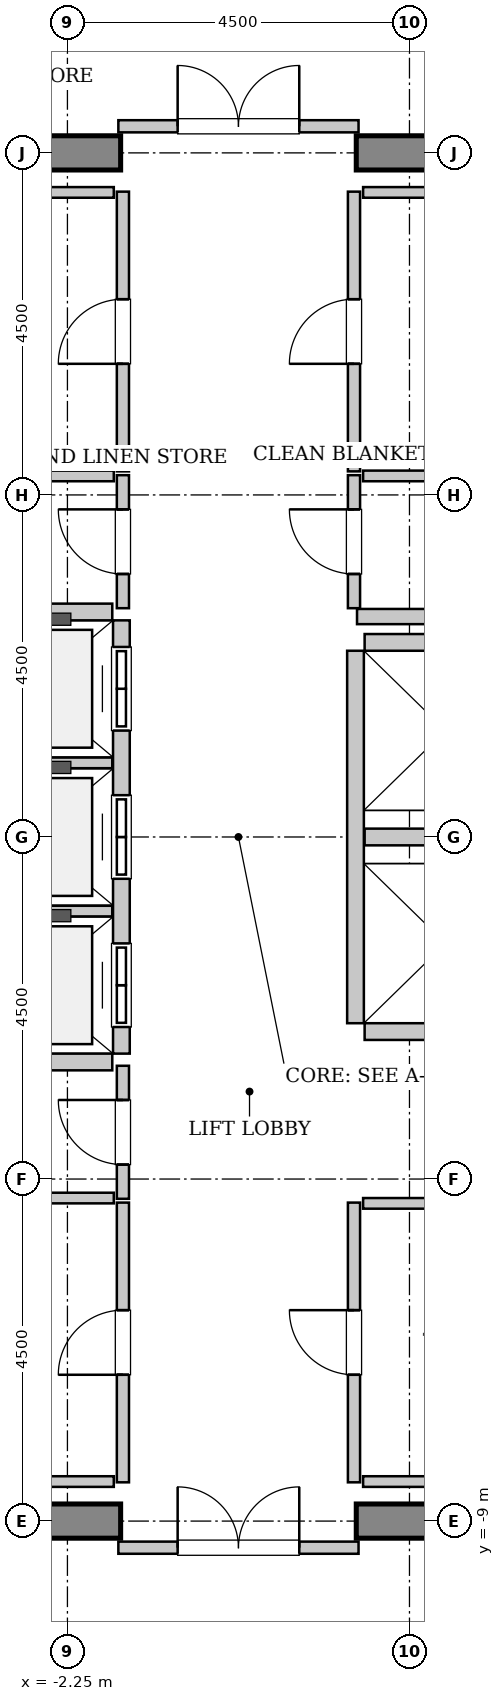
"""IFC4 building model, lengths in metres.
Left out: names, types, materials, properties, quantities, classifications, styles, units other than length and angle.
Written with IfcOpenShell. Run it as: python <this file> out.ifc"""

import sys

from ifc_helpers import new_model, si_unit, direction, frame, frame_2d, origin, place, context, subcontext, project, spatial, rectangle, extrude, source, transform, mapped, element, fill, save


model = new_model("IFC4")
c1 = context("Model", 3, precision=1e-05, world=origin(), true_north=direction((0.0, 1.0)))
c2 = subcontext(c1, "Body", "Model", "MODEL_VIEW")
j1 = project(units=[si_unit("LENGTHUNIT", "METRE"), si_unit("PLANEANGLEUNIT", "RADIAN")], contexts=[c1])
p1 = place(None, origin())
s1 = spatial("IfcSite", under=j1, at=p1, CompositionType="ELEMENT")
p2 = place(p1, origin())
s2 = spatial("IfcBuilding", under=s1, at=p2, CompositionType="ELEMENT")
p3 = place(p2, frame((0.0, 0.0, 295.0)))
s3 = spatial("IfcBuildingStorey", under=s2, at=p3, CompositionType="ELEMENT", Elevation=295.0)
m1 = source(origin(), c2, "Body", "SweptSolid", [
    extrude(rectangle(XDim=9.925, YDim=0.45, at=frame_2d((4.962, 0.0))), origin(), (0.0, 0.0, 1.0), 3.8),
])
for number, where, z_axis, x_axis in (
    (1, (-11.475, 9.0, 0.0), (0.0, 0.0, 1.0), (1.0, 0.0, 0.0)),
    (2, (1.55, 9.0, 0.0), (0.0, 0.0, 1.0), (1.0, 0.0, 0.0)),
    (3, (-11.475, -9.0, 0.0), (0.0, 0.0, 1.0), (1.0, 0.0, 0.0)),
    (4, (1.55, -9.0, 0.0), (0.0, 0.0, 1.0), (1.0, 0.0, 0.0)),
):
    element("IfcWall", number, at=place(p3, frame(where, z_axis=z_axis, x_axis=x_axis)), inside=s3, PredefinedType="SHEAR", context=c2, shape_type="MappedRepresentation", body=[
        mapped(m1, transform((0.0, 0.0, 0.0), x_axis=(1.0, 0.0, 0.0), y_axis=(0.0, 1.0, 0.0), z_axis=(0.0, 0.0, 1.0), scale=1.0)),
    ])
m2 = source(origin(), c2, "Body", "SweptSolid", [
    extrude(rectangle(XDim=5.7, YDim=0.22, at=frame_2d((2.85, 0.0))), origin(), (0.0, 0.0, 1.0), 3.535),
])
p4 = place(p3, frame((-1.54, -2.85, 0.0), z_axis=(0.0, 0.0, 1.0), x_axis=(0.0, 1.0, 0.0)))
e5 = element("IfcWall", 5, at=p4, inside=s3, PredefinedType="SOLIDWALL", context=c2, shape_type="MappedRepresentation", body=[
    mapped(m2, transform((0.0, 0.0, 0.0), x_axis=(1.0, 0.0, 0.0), y_axis=(0.0, 1.0, 0.0), z_axis=(0.0, 0.0, 1.0), scale=1.0)),
])
p5 = place(p4, frame((0.35, 0.0, 0.0)))
e6 = element("IfcOpeningElement", 6, at=p5, cuts=e5, PredefinedType="OPENING", context=c2, shape_type="SweptSolid", body=[
    extrude(rectangle(XDim=1.1, YDim=2.2, at=frame_2d((0.55, 1.1))), frame((0.0, 0.12, 0.0), z_axis=(0.0, -1.0, 0.0), x_axis=(1.0, 0.0, 0.0)), (0.0, 0.0, 1.0), 0.24),
])
p6 = place(p4, frame((2.3, 0.0, 0.0)))
e7 = element("IfcOpeningElement", 7, at=p6, cuts=e5, PredefinedType="OPENING", context=c2, shape_type="SweptSolid", body=[
    extrude(rectangle(XDim=1.1, YDim=2.2, at=frame_2d((0.55, 1.1))), frame((0.0, 0.12, 0.0), z_axis=(0.0, -1.0, 0.0), x_axis=(1.0, 0.0, 0.0)), (0.0, 0.0, 1.0), 0.24),
])
p7 = place(p4, frame((4.25, 0.0, 0.0)))
e8 = element("IfcOpeningElement", 8, at=p7, cuts=e5, PredefinedType="OPENING", context=c2, shape_type="SweptSolid", body=[
    extrude(rectangle(XDim=1.1, YDim=2.2, at=frame_2d((0.55, 1.1))), frame((0.0, 0.12, 0.0), z_axis=(0.0, -1.0, 0.0), x_axis=(1.0, 0.0, 0.0)), (0.0, 0.0, 1.0), 0.24),
])
m3 = source(origin(), c2, "Body", "SweptSolid", [
    extrude(rectangle(XDim=2.13, YDim=0.22, at=frame_2d((1.065, 0.0))), origin(), (0.0, 0.0, 1.0), 3.535),
])
p8 = place(p3, frame((-3.79, -2.96, 0.0), z_axis=(0.0, 0.0, 1.0), x_axis=(1.0, 0.0, 0.0)))
e9 = element("IfcWall", 9, at=p8, inside=s3, PredefinedType="SOLIDWALL", context=c2, shape_type="MappedRepresentation", body=[
    mapped(m3, transform((0.0, 0.0, 0.0), x_axis=(1.0, 0.0, 0.0), y_axis=(0.0, 1.0, 0.0), z_axis=(0.0, 0.0, 1.0), scale=1.0)),
])
m4 = source(origin(), c2, "Body", "SweptSolid", [
    extrude(rectangle(XDim=2.13, YDim=0.14, at=frame_2d((1.065, 0.0))), origin(), (0.0, 0.0, 1.0), 3.535),
])
for number, where, z_axis, x_axis in (
    (10, (-3.79, -0.975, 0.0), (0.0, 0.0, 1.0), (1.0, 0.0, 0.0)),
    (11, (-3.79, 0.975, 0.0), (0.0, 0.0, 1.0), (1.0, 0.0, 0.0)),
):
    element("IfcWall", number, at=place(p3, frame(where, z_axis=z_axis, x_axis=x_axis)), inside=s3, PredefinedType="PARTITIONING", context=c2, shape_type="MappedRepresentation", body=[
        mapped(m4, transform((0.0, 0.0, 0.0), x_axis=(1.0, 0.0, 0.0), y_axis=(0.0, 1.0, 0.0), z_axis=(0.0, 0.0, 1.0), scale=1.0)),
    ])
p9 = place(p3, frame((-1.66, 2.96, 0.0), z_axis=(0.0, 0.0, 1.0), x_axis=(-1.0, 0.0, 0.0)))
e12 = element("IfcWall", 12, at=p9, inside=s3, PredefinedType="SOLIDWALL", context=c2, shape_type="MappedRepresentation", body=[
    mapped(m3, transform((0.0, 0.0, 0.0), x_axis=(1.0, 0.0, 0.0), y_axis=(0.0, 1.0, 0.0), z_axis=(0.0, 0.0, 1.0), scale=1.0)),
])
m5 = source(origin(), c2, "Body", "SweptSolid", [
    extrude(rectangle(XDim=4.9, YDim=0.22, at=frame_2d((2.45, 0.0))), origin(), (0.0, 0.0, 1.0), 3.535),
])
p10 = place(p3, frame((1.54, 2.45, 0.0), z_axis=(0.0, 0.0, 1.0), x_axis=(0.0, -1.0, 0.0)))
e13 = element("IfcWall", 13, at=p10, inside=s3, PredefinedType="SOLIDWALL", context=c2, shape_type="MappedRepresentation", body=[
    mapped(m5, transform((0.0, 0.0, 0.0), x_axis=(1.0, 0.0, 0.0), y_axis=(0.0, 1.0, 0.0), z_axis=(0.0, 0.0, 1.0), scale=1.0)),
])
for number, where, z_axis, x_axis in (
    (14, (1.66, -2.56, 0.0), (0.0, 0.0, 1.0), (1.0, 0.0, 0.0)),
    (15, (1.66, 0.0, 0.0), (0.0, 0.0, 1.0), (1.0, 0.0, 0.0)),
    (16, (3.79, 2.56, 0.0), (0.0, 0.0, 1.0), (-1.0, 0.0, 0.0)),
):
    element("IfcWall", number, at=place(p3, frame(where, z_axis=z_axis, x_axis=x_axis)), inside=s3, PredefinedType="SOLIDWALL", context=c2, shape_type="MappedRepresentation", body=[
        mapped(m3, transform((0.0, 0.0, 0.0), x_axis=(1.0, 0.0, 0.0), y_axis=(0.0, 1.0, 0.0), z_axis=(0.0, 0.0, 1.0), scale=1.0)),
    ])
m6 = source(origin(), c2, "Body", "SweptSolid", [
    extrude(rectangle(XDim=2.52, YDim=0.2, at=frame_2d((1.26, 0.0))), origin(), (0.0, 0.0, 1.0), 3.535),
])
p11 = place(p3, frame((1.56, 2.9, 0.0), z_axis=(0.0, 0.0, 1.0), x_axis=(1.0, 0.0, 0.0)))
e17 = element("IfcWall", 17, at=p11, inside=s3, PredefinedType="PARTITIONING", context=c2, shape_type="MappedRepresentation", body=[
    mapped(m6, transform((0.0, 0.0, 0.0), x_axis=(1.0, 0.0, 0.0), y_axis=(0.0, 1.0, 0.0), z_axis=(0.0, 0.0, 1.0), scale=1.0)),
])
m7 = source(origin(), c2, "Body", "SweptSolid", [
    extrude(rectangle(XDim=3.16, YDim=0.16, at=frame_2d((1.58, 0.0))), origin(), (0.0, 0.0, 1.0), 2.625),
])
p12 = place(p3, frame((-1.58, 9.35, 0.0), z_axis=(0.0, 0.0, 1.0), x_axis=(1.0, 0.0, 0.0)))
e18 = element("IfcWall", 18, at=p12, inside=s3, PredefinedType="PARTITIONING", context=c2, shape_type="MappedRepresentation", body=[
    mapped(m7, transform((0.0, 0.0, 0.0), x_axis=(1.0, 0.0, 0.0), y_axis=(0.0, 1.0, 0.0), z_axis=(0.0, 0.0, 1.0), scale=1.0)),
])
p13 = place(p12, frame((0.78, 0.0, 0.0)))
e19 = element("IfcOpeningElement", 19, at=p13, cuts=e18, PredefinedType="OPENING", context=c2, shape_type="SweptSolid", body=[
    extrude(rectangle(XDim=1.6, YDim=2.3, at=frame_2d((0.8, 1.15))), frame((0.0, 0.09, 0.0), z_axis=(0.0, -1.0, 0.0), x_axis=(1.0, 0.0, 0.0)), (0.0, 0.0, 1.0), 0.18),
])
p14 = place(p3, frame((-1.58, -9.35, 0.0), z_axis=(0.0, 0.0, 1.0), x_axis=(1.0, 0.0, 0.0)))
e20 = element("IfcWall", 20, at=p14, inside=s3, PredefinedType="PARTITIONING", context=c2, shape_type="MappedRepresentation", body=[
    mapped(m7, transform((0.0, 0.0, 0.0), x_axis=(1.0, 0.0, 0.0), y_axis=(0.0, 1.0, 0.0), z_axis=(0.0, 0.0, 1.0), scale=1.0)),
])
p15 = place(p14, frame((0.78, 0.0, 0.0)))
e21 = element("IfcOpeningElement", 21, at=p15, cuts=e20, PredefinedType="OPENING", context=c2, shape_type="SweptSolid", body=[
    extrude(rectangle(XDim=1.6, YDim=2.3, at=frame_2d((0.8, 1.15))), frame((0.0, 0.09, 0.0), z_axis=(0.0, -1.0, 0.0), x_axis=(1.0, 0.0, 0.0)), (0.0, 0.0, 1.0), 0.18),
])
m8 = source(origin(), c2, "Body", "SweptSolid", [
    extrude(rectangle(XDim=1.75, YDim=0.16, at=frame_2d((0.875, 0.0))), origin(), (0.0, 0.0, 1.0), 3.535),
])
p16 = place(p3, frame((-1.52, 3.01, 0.0), z_axis=(0.0, 0.0, 1.0), x_axis=(0.0, 1.0, 0.0)))
e22 = element("IfcWall", 22, at=p16, inside=s3, PredefinedType="PARTITIONING", context=c2, shape_type="MappedRepresentation", body=[
    mapped(m8, transform((0.0, 0.0, 0.0), x_axis=(1.0, 0.0, 0.0), y_axis=(0.0, 1.0, 0.0), z_axis=(0.0, 0.0, 1.0), scale=1.0)),
])
p17 = place(p16, frame((0.45, 0.0, 0.0)))
e23 = element("IfcOpeningElement", 23, at=p17, cuts=e22, PredefinedType="OPENING", context=c2, shape_type="SweptSolid", body=[
    extrude(rectangle(XDim=0.85, YDim=2.1, at=frame_2d((0.425, 1.05))), frame((0.0, 0.09, 0.0), z_axis=(0.0, -1.0, 0.0), x_axis=(1.0, 0.0, 0.0)), (0.0, 0.0, 1.0), 0.18),
])
m9 = source(origin(), c2, "Body", "SweptSolid", [
    extrude(rectangle(XDim=2.95, YDim=0.14, at=frame_2d((1.475, 0.0))), origin(), (0.0, 0.0, 1.0), 3.535),
])
p18 = place(p3, frame((-4.59, 4.75, 0.0), z_axis=(0.0, 0.0, 1.0), x_axis=(1.0, 0.0, 0.0)))
e24 = element("IfcWall", 24, at=p18, inside=s3, PredefinedType="PARTITIONING", context=c2, shape_type="MappedRepresentation", body=[
    mapped(m9, transform((0.0, 0.0, 0.0), x_axis=(1.0, 0.0, 0.0), y_axis=(0.0, 1.0, 0.0), z_axis=(0.0, 0.0, 1.0), scale=1.0)),
])
m10 = source(origin(), c2, "Body", "SweptSolid", [
    extrude(rectangle(XDim=3.68, YDim=0.16, at=frame_2d((1.84, 0.0))), origin(), (0.0, 0.0, 1.0), 3.535),
])
p19 = place(p3, frame((-1.52, 4.81, 0.0), z_axis=(0.0, 0.0, 1.0), x_axis=(0.0, 1.0, 0.0)))
e25 = element("IfcWall", 25, at=p19, inside=s3, PredefinedType="PARTITIONING", context=c2, shape_type="MappedRepresentation", body=[
    mapped(m10, transform((0.0, 0.0, 0.0), x_axis=(1.0, 0.0, 0.0), y_axis=(0.0, 1.0, 0.0), z_axis=(0.0, 0.0, 1.0), scale=1.0)),
])
p20 = place(p19, frame((1.415, 0.0, 0.0)))
e26 = element("IfcOpeningElement", 26, at=p20, cuts=e25, PredefinedType="OPENING", context=c2, shape_type="SweptSolid", body=[
    extrude(rectangle(XDim=0.85, YDim=2.1, at=frame_2d((0.425, 1.05))), frame((0.0, 0.09, 0.0), z_axis=(0.0, -1.0, 0.0), x_axis=(1.0, 0.0, 0.0)), (0.0, 0.0, 1.0), 0.18),
])
m11 = source(origin(), c2, "Body", "SweptSolid", [
    extrude(rectangle(XDim=3.15, YDim=0.14, at=frame_2d((1.575, 0.0))), origin(), (0.0, 0.0, 1.0), 3.535),
])
p21 = place(p3, frame((-4.79, 8.48, 0.0), z_axis=(0.0, 0.0, 1.0), x_axis=(1.0, 0.0, 0.0)))
e27 = element("IfcWall", 27, at=p21, inside=s3, PredefinedType="PARTITIONING", context=c2, shape_type="MappedRepresentation", body=[
    mapped(m11, transform((0.0, 0.0, 0.0), x_axis=(1.0, 0.0, 0.0), y_axis=(0.0, 1.0, 0.0), z_axis=(0.0, 0.0, 1.0), scale=1.0)),
])
p22 = place(p3, frame((1.52, 3.01, 0.0), z_axis=(0.0, 0.0, 1.0), x_axis=(0.0, 1.0, 0.0)))
e28 = element("IfcWall", 28, at=p22, inside=s3, PredefinedType="PARTITIONING", context=c2, shape_type="MappedRepresentation", body=[
    mapped(m8, transform((0.0, 0.0, 0.0), x_axis=(1.0, 0.0, 0.0), y_axis=(0.0, 1.0, 0.0), z_axis=(0.0, 0.0, 1.0), scale=1.0)),
])
p23 = place(p22, frame((0.45, 0.0, 0.0)))
e29 = element("IfcOpeningElement", 29, at=p23, cuts=e28, PredefinedType="OPENING", context=c2, shape_type="SweptSolid", body=[
    extrude(rectangle(XDim=0.85, YDim=2.1, at=frame_2d((0.425, 1.05))), frame((0.0, 0.09, 0.0), z_axis=(0.0, -1.0, 0.0), x_axis=(1.0, 0.0, 0.0)), (0.0, 0.0, 1.0), 0.18),
])
p24 = place(p3, frame((1.64, 4.75, 0.0), z_axis=(0.0, 0.0, 1.0), x_axis=(1.0, 0.0, 0.0)))
e30 = element("IfcWall", 30, at=p24, inside=s3, PredefinedType="PARTITIONING", context=c2, shape_type="MappedRepresentation", body=[
    mapped(m11, transform((0.0, 0.0, 0.0), x_axis=(1.0, 0.0, 0.0), y_axis=(0.0, 1.0, 0.0), z_axis=(0.0, 0.0, 1.0), scale=1.0)),
])
p25 = place(p3, frame((1.52, 4.81, 0.0), z_axis=(0.0, 0.0, 1.0), x_axis=(0.0, 1.0, 0.0)))
e31 = element("IfcWall", 31, at=p25, inside=s3, PredefinedType="PARTITIONING", context=c2, shape_type="MappedRepresentation", body=[
    mapped(m10, transform((0.0, 0.0, 0.0), x_axis=(1.0, 0.0, 0.0), y_axis=(0.0, 1.0, 0.0), z_axis=(0.0, 0.0, 1.0), scale=1.0)),
])
p26 = place(p25, frame((1.415, 0.0, 0.0)))
e32 = element("IfcOpeningElement", 32, at=p26, cuts=e31, PredefinedType="OPENING", context=c2, shape_type="SweptSolid", body=[
    extrude(rectangle(XDim=0.85, YDim=2.1, at=frame_2d((0.425, 1.05))), frame((0.0, 0.09, 0.0), z_axis=(0.0, -1.0, 0.0), x_axis=(1.0, 0.0, 0.0)), (0.0, 0.0, 1.0), 0.18),
])
p27 = place(p3, frame((1.64, 8.48, 0.0), z_axis=(0.0, 0.0, 1.0), x_axis=(1.0, 0.0, 0.0)))
e33 = element("IfcWall", 33, at=p27, inside=s3, PredefinedType="PARTITIONING", context=c2, shape_type="MappedRepresentation", body=[
    mapped(m11, transform((0.0, 0.0, 0.0), x_axis=(1.0, 0.0, 0.0), y_axis=(0.0, 1.0, 0.0), z_axis=(0.0, 0.0, 1.0), scale=1.0)),
])
p28 = place(p3, frame((-1.52, -4.76, 0.0), z_axis=(0.0, 0.0, 1.0), x_axis=(0.0, 1.0, 0.0)))
e34 = element("IfcWall", 34, at=p28, inside=s3, PredefinedType="PARTITIONING", context=c2, shape_type="MappedRepresentation", body=[
    mapped(m8, transform((0.0, 0.0, 0.0), x_axis=(1.0, 0.0, 0.0), y_axis=(0.0, 1.0, 0.0), z_axis=(0.0, 0.0, 1.0), scale=1.0)),
])
p29 = place(p28, frame((0.45, 0.0, 0.0)))
e35 = element("IfcOpeningElement", 35, at=p29, cuts=e34, PredefinedType="OPENING", context=c2, shape_type="SweptSolid", body=[
    extrude(rectangle(XDim=0.85, YDim=2.1, at=frame_2d((0.425, 1.05))), frame((0.0, 0.09, 0.0), z_axis=(0.0, -1.0, 0.0), x_axis=(1.0, 0.0, 0.0)), (0.0, 0.0, 1.0), 0.18),
])
p30 = place(p3, frame((-4.79, -4.75, 0.0), z_axis=(0.0, 0.0, 1.0), x_axis=(1.0, 0.0, 0.0)))
e36 = element("IfcWall", 36, at=p30, inside=s3, PredefinedType="PARTITIONING", context=c2, shape_type="MappedRepresentation", body=[
    mapped(m11, transform((0.0, 0.0, 0.0), x_axis=(1.0, 0.0, 0.0), y_axis=(0.0, 1.0, 0.0), z_axis=(0.0, 0.0, 1.0), scale=1.0)),
])
p31 = place(p3, frame((-1.52, -8.49, 0.0), z_axis=(0.0, 0.0, 1.0), x_axis=(0.0, 1.0, 0.0)))
e37 = element("IfcWall", 37, at=p31, inside=s3, PredefinedType="PARTITIONING", context=c2, shape_type="MappedRepresentation", body=[
    mapped(m10, transform((0.0, 0.0, 0.0), x_axis=(1.0, 0.0, 0.0), y_axis=(0.0, 1.0, 0.0), z_axis=(0.0, 0.0, 1.0), scale=1.0)),
])
p32 = place(p31, frame((1.415, 0.0, 0.0)))
e38 = element("IfcOpeningElement", 38, at=p32, cuts=e37, PredefinedType="OPENING", context=c2, shape_type="SweptSolid", body=[
    extrude(rectangle(XDim=0.85, YDim=2.1, at=frame_2d((0.425, 1.05))), frame((0.0, 0.09, 0.0), z_axis=(0.0, -1.0, 0.0), x_axis=(1.0, 0.0, 0.0)), (0.0, 0.0, 1.0), 0.18),
])
m12 = source(origin(), c2, "Body", "SweptSolid", [
    extrude(rectangle(XDim=3.03, YDim=0.14, at=frame_2d((1.515, 0.0))), origin(), (0.0, 0.0, 1.0), 3.535),
])
p33 = place(p3, frame((-4.67, -8.48, 0.0), z_axis=(0.0, 0.0, 1.0), x_axis=(1.0, 0.0, 0.0)))
e39 = element("IfcWall", 39, at=p33, inside=s3, PredefinedType="PARTITIONING", context=c2, shape_type="MappedRepresentation", body=[
    mapped(m12, transform((0.0, 0.0, 0.0), x_axis=(1.0, 0.0, 0.0), y_axis=(0.0, 1.0, 0.0), z_axis=(0.0, 0.0, 1.0), scale=1.0)),
])
p34 = place(p3, frame((1.52, -8.49, 0.0), z_axis=(0.0, 0.0, 1.0), x_axis=(0.0, 1.0, 0.0)))
e40 = element("IfcWall", 40, at=p34, inside=s3, PredefinedType="PARTITIONING", context=c2, shape_type="MappedRepresentation", body=[
    mapped(m10, transform((0.0, 0.0, 0.0), x_axis=(1.0, 0.0, 0.0), y_axis=(0.0, 1.0, 0.0), z_axis=(0.0, 0.0, 1.0), scale=1.0)),
])
p35 = place(p34, frame((1.415, 0.0, 0.0)))
e41 = element("IfcOpeningElement", 41, at=p35, cuts=e40, PredefinedType="OPENING", context=c2, shape_type="SweptSolid", body=[
    extrude(rectangle(XDim=0.85, YDim=2.1, at=frame_2d((0.425, 1.05))), frame((0.0, 0.09, 0.0), z_axis=(0.0, -1.0, 0.0), x_axis=(1.0, 0.0, 0.0)), (0.0, 0.0, 1.0), 0.18),
])
p36 = place(p3, frame((1.64, -4.82, 0.0), z_axis=(0.0, 0.0, 1.0), x_axis=(1.0, 0.0, 0.0)))
e42 = element("IfcWall", 42, at=p36, inside=s3, PredefinedType="PARTITIONING", context=c2, shape_type="MappedRepresentation", body=[
    mapped(m9, transform((0.0, 0.0, 0.0), x_axis=(1.0, 0.0, 0.0), y_axis=(0.0, 1.0, 0.0), z_axis=(0.0, 0.0, 1.0), scale=1.0)),
])
p37 = place(p3, frame((1.64, -8.48, 0.0), z_axis=(0.0, 0.0, 1.0), x_axis=(1.0, 0.0, 0.0)))
e43 = element("IfcWall", 43, at=p37, inside=s3, PredefinedType="PARTITIONING", context=c2, shape_type="MappedRepresentation", body=[
    mapped(m11, transform((0.0, 0.0, 0.0), x_axis=(1.0, 0.0, 0.0), y_axis=(0.0, 1.0, 0.0), z_axis=(0.0, 0.0, 1.0), scale=1.0)),
])
m13 = source(origin(), c2, "Body", "SweptSolid", [
    extrude(rectangle(XDim=1.1, YDim=2.2, at=frame_2d((0.55, 1.1))), frame((0.0, 0.025, 0.0), z_axis=(0.0, -1.0, 0.0), x_axis=(1.0, 0.0, 0.0)), (0.0, 0.0, 1.0), 0.05),
])
p38 = place(p5, origin())
e44 = element("IfcDoor", 44, at=p38, inside=s3, OperationType="DOUBLE_DOOR_SLIDING", PredefinedType="DOOR", context=c2, shape_type="MappedRepresentation", body=[
    mapped(m13, transform((0.0, 0.0, 0.0), x_axis=(1.0, 0.0, 0.0), y_axis=(0.0, 1.0, 0.0), z_axis=(0.0, 0.0, 1.0), scale=1.0)),
])
fill(e6, e44)
p39 = place(p6, origin())
e45 = element("IfcDoor", 45, at=p39, inside=s3, OperationType="DOUBLE_DOOR_SLIDING", PredefinedType="DOOR", context=c2, shape_type="MappedRepresentation", body=[
    mapped(m13, transform((0.0, 0.0, 0.0), x_axis=(1.0, 0.0, 0.0), y_axis=(0.0, 1.0, 0.0), z_axis=(0.0, 0.0, 1.0), scale=1.0)),
])
fill(e7, e45)
p40 = place(p7, origin())
e46 = element("IfcDoor", 46, at=p40, inside=s3, OperationType="DOUBLE_DOOR_SLIDING", PredefinedType="DOOR", context=c2, shape_type="MappedRepresentation", body=[
    mapped(m13, transform((0.0, 0.0, 0.0), x_axis=(1.0, 0.0, 0.0), y_axis=(0.0, 1.0, 0.0), z_axis=(0.0, 0.0, 1.0), scale=1.0)),
])
fill(e8, e46)
m14 = source(origin(), c2, "Body", "SweptSolid", [
    extrude(rectangle(XDim=1.6, YDim=2.3, at=frame_2d((0.8, 1.15))), frame((0.0, 0.025, 0.0), z_axis=(0.0, -1.0, 0.0), x_axis=(1.0, 0.0, 0.0)), (0.0, 0.0, 1.0), 0.05),
])
p41 = place(p13, origin())
e47 = element("IfcDoor", 47, at=p41, inside=s3, OperationType="DOUBLE_DOOR_SINGLE_SWING", PredefinedType="DOOR", context=c2, shape_type="MappedRepresentation", body=[
    mapped(m14, transform((0.0, 0.0, 0.0), x_axis=(1.0, 0.0, 0.0), y_axis=(0.0, 1.0, 0.0), z_axis=(0.0, 0.0, 1.0), scale=1.0)),
])
fill(e19, e47)
p42 = place(p15, origin())
e48 = element("IfcDoor", 48, at=p42, inside=s3, OperationType="DOUBLE_DOOR_SINGLE_SWING", PredefinedType="DOOR", context=c2, shape_type="MappedRepresentation", body=[
    mapped(m14, transform((0.0, 0.0, 0.0), x_axis=(1.0, 0.0, 0.0), y_axis=(0.0, 1.0, 0.0), z_axis=(0.0, 0.0, 1.0), scale=1.0)),
])
fill(e21, e48)
m15 = source(origin(), c2, "Body", "SweptSolid", [
    extrude(rectangle(XDim=0.85, YDim=2.1, at=frame_2d((0.425, 1.05))), frame((0.0, 0.025, 0.0), z_axis=(0.0, -1.0, 0.0), x_axis=(1.0, 0.0, 0.0)), (0.0, 0.0, 1.0), 0.05),
])
p43 = place(p17, origin())
e49 = element("IfcDoor", 49, at=p43, inside=s3, OperationType="SINGLE_SWING_RIGHT", PredefinedType="DOOR", context=c2, shape_type="MappedRepresentation", body=[
    mapped(m15, transform((0.0, 0.0, 0.0), x_axis=(1.0, 0.0, 0.0), y_axis=(0.0, 1.0, 0.0), z_axis=(0.0, 0.0, 1.0), scale=1.0)),
])
fill(e23, e49)
p44 = place(p20, origin())
e50 = element("IfcDoor", 50, at=p44, inside=s3, OperationType="SINGLE_SWING_LEFT", PredefinedType="DOOR", context=c2, shape_type="MappedRepresentation", body=[
    mapped(m15, transform((0.0, 0.0, 0.0), x_axis=(1.0, 0.0, 0.0), y_axis=(0.0, 1.0, 0.0), z_axis=(0.0, 0.0, 1.0), scale=1.0)),
])
fill(e26, e50)
p45 = place(p23, origin())
e51 = element("IfcDoor", 51, at=p45, inside=s3, OperationType="SINGLE_SWING_RIGHT", PredefinedType="DOOR", context=c2, shape_type="MappedRepresentation", body=[
    mapped(m15, transform((0.0, 0.0, 0.0), x_axis=(1.0, 0.0, 0.0), y_axis=(0.0, 1.0, 0.0), z_axis=(0.0, 0.0, 1.0), scale=1.0)),
])
fill(e29, e51)
p46 = place(p26, origin())
e52 = element("IfcDoor", 52, at=p46, inside=s3, OperationType="SINGLE_SWING_LEFT", PredefinedType="DOOR", context=c2, shape_type="MappedRepresentation", body=[
    mapped(m15, transform((0.0, 0.0, 0.0), x_axis=(1.0, 0.0, 0.0), y_axis=(0.0, 1.0, 0.0), z_axis=(0.0, 0.0, 1.0), scale=1.0)),
])
fill(e32, e52)
p47 = place(p29, origin())
e53 = element("IfcDoor", 53, at=p47, inside=s3, OperationType="SINGLE_SWING_RIGHT", PredefinedType="DOOR", context=c2, shape_type="MappedRepresentation", body=[
    mapped(m15, transform((0.0, 0.0, 0.0), x_axis=(1.0, 0.0, 0.0), y_axis=(0.0, 1.0, 0.0), z_axis=(0.0, 0.0, 1.0), scale=1.0)),
])
fill(e35, e53)
p48 = place(p32, origin())
e54 = element("IfcDoor", 54, at=p48, inside=s3, OperationType="SINGLE_SWING_LEFT", PredefinedType="DOOR", context=c2, shape_type="MappedRepresentation", body=[
    mapped(m15, transform((0.0, 0.0, 0.0), x_axis=(1.0, 0.0, 0.0), y_axis=(0.0, 1.0, 0.0), z_axis=(0.0, 0.0, 1.0), scale=1.0)),
])
fill(e38, e54)
p49 = place(p35, origin())
e55 = element("IfcDoor", 55, at=p49, inside=s3, OperationType="SINGLE_SWING_RIGHT", PredefinedType="DOOR", context=c2, shape_type="MappedRepresentation", body=[
    mapped(m15, transform((0.0, 0.0, 0.0), x_axis=(1.0, 0.0, 0.0), y_axis=(0.0, 1.0, 0.0), z_axis=(0.0, 0.0, 1.0), scale=1.0)),
])
fill(e41, e55)
save(model, sys.argv[1])
